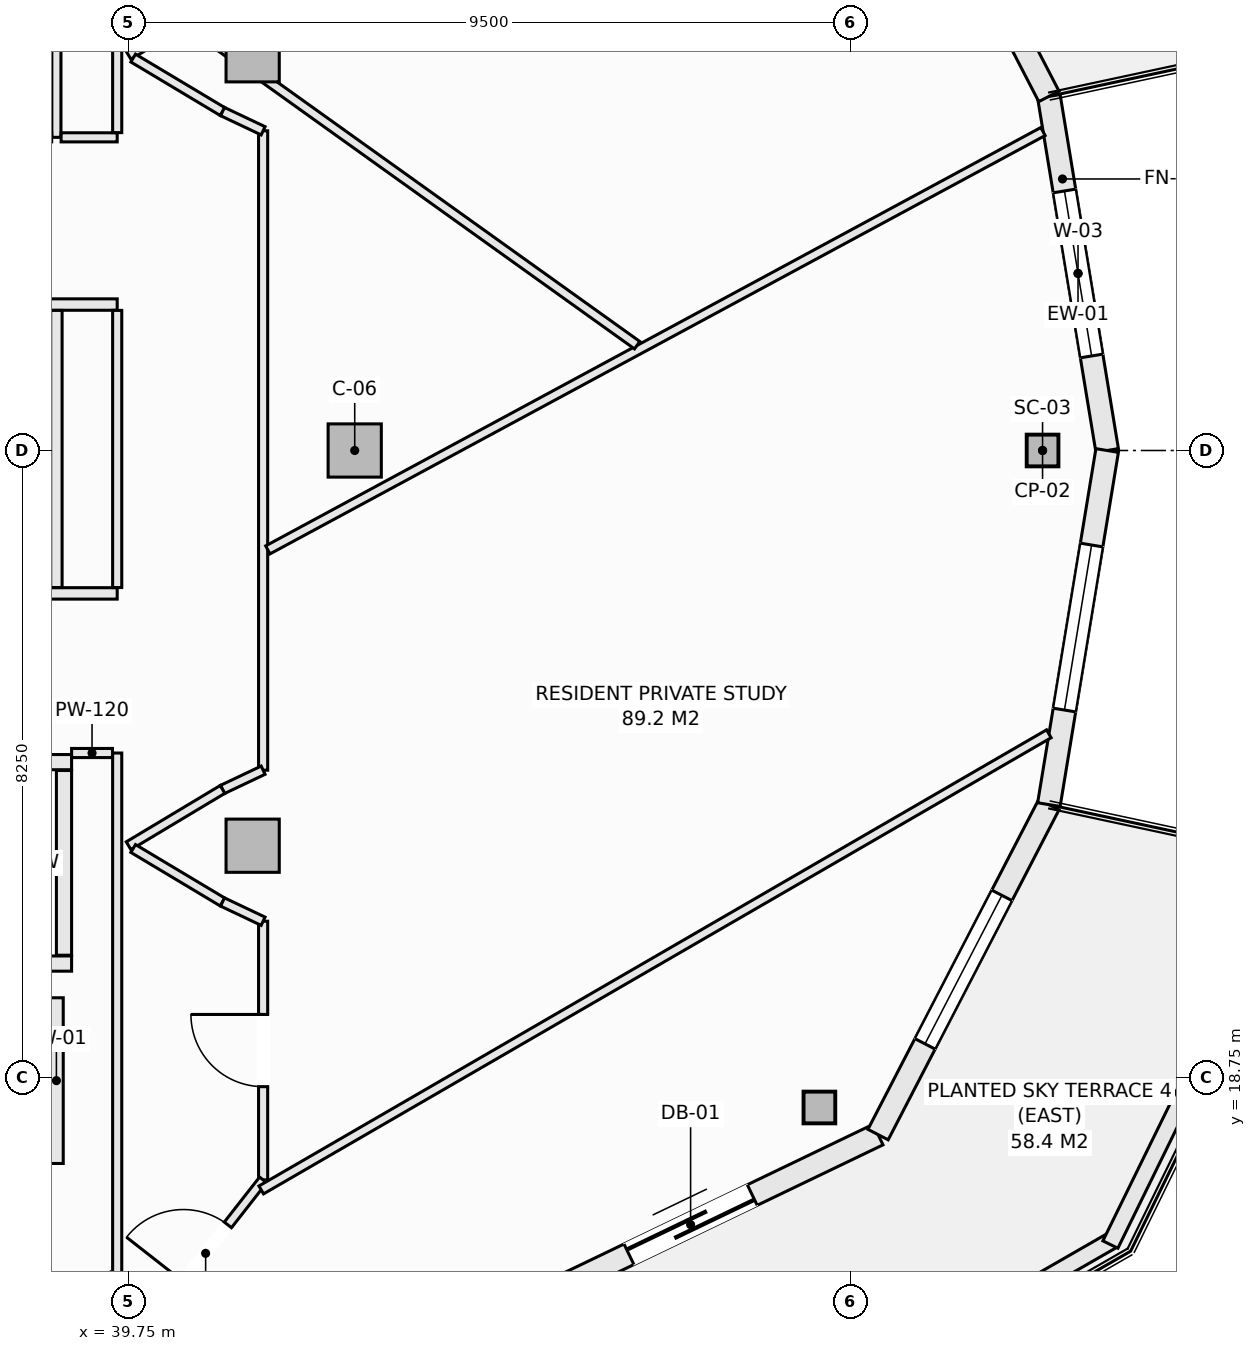
"""IFC4 building model, lengths in metres.
Left out: names, types, materials, properties, quantities, classifications, styles, units other than length and angle.
Written with IfcOpenShell. Run it as: python <this file> out.ifc"""

import sys

from ifc_helpers import new_model, si_unit, direction, frame, frame_2d, origin, origin_2d, place, context, subcontext, project, spatial, rectangle, hollow_rectangle, extrude, element, fill, save


model = new_model("IFC4")
c1 = context("Model", 3, precision=1e-05, world=origin(), true_north=direction((0.0, 1.0)))
c2 = subcontext(c1, "Body", "Model", "MODEL_VIEW")
j1 = project(units=[si_unit("LENGTHUNIT", "METRE"), si_unit("PLANEANGLEUNIT", "RADIAN")], contexts=[c1])
p1 = place(None, origin())
s1 = spatial("IfcSite", under=j1, at=p1, CompositionType="ELEMENT")
p2 = place(p1, origin())
s2 = spatial("IfcBuilding", under=s1, at=p2, CompositionType="ELEMENT")
p3 = place(p2, frame((0.0, 0.0, 255.8)))
s3 = spatial("IfcBuildingStorey", under=s2, at=p3, CompositionType="ELEMENT", Elevation=255.8)
for number, where, z_axis, x_axis in (
    (1, (51.775, 27.0, -0.27), (0.0, 0.0, 1.0), (1.0, 0.0, 0.0)),
    (2, (48.839, 18.356, -0.27), (0.0, 0.0, 1.0), (1.0, 0.0, 0.0)),
):
    element("IfcColumn", number, at=place(p3, frame(where, z_axis=z_axis, x_axis=x_axis)), inside=s3, PredefinedType="COLUMN", context=c2, shape_type="SweptSolid", body=[
        extrude(hollow_rectangle(XDim=0.406, YDim=0.406, WallThickness=0.016, at=origin_2d()), origin(), (0.0, 0.0, 1.0), 3.3),
    ])
for number, where, z_axis, x_axis in (
    (3, (42.725, 27.0, -0.27), (0.0, 0.0, 1.0), (1.0, 0.0, 0.0)),
    (4, (41.382, 32.199, -0.27), (0.0, 0.0, 1.0), (1.0, 0.0, 0.0)),
    (5, (41.382, 21.801, -0.27), (0.0, 0.0, 1.0), (1.0, 0.0, 0.0)),
):
    element("IfcColumn", number, at=place(p3, frame(where, z_axis=z_axis, x_axis=x_axis)), inside=s3, PredefinedType="COLUMN", context=c2, shape_type="SweptSolid", body=[
        extrude(rectangle(XDim=0.7, YDim=0.7, at=origin_2d()), origin(), (0.0, 0.0, 1.0), 3.3),
    ])
p4 = place(p3, frame((51.858, 31.659, 0.0), z_axis=(0.0, 0.0, 1.0), x_axis=(0.162369371657, -0.986730047758, 0.0)))
e6 = element("IfcWall", 6, at=p4, inside=s3, PredefinedType="SOLIDWALL", context=c2, shape_type="SweptSolid", body=[
    extrude(rectangle(XDim=4.721, YDim=0.3, at=frame_2d((2.361, 0.0))), origin(), (0.0, 0.0, 1.0), 2.605),
])
p5 = place(p4, frame((1.261, 0.0, 0.72)))
e7 = element("IfcOpeningElement", 7, at=p5, cuts=e6, PredefinedType="OPENING", context=c2, shape_type="SweptSolid", body=[
    extrude(rectangle(XDim=2.2, YDim=1.65, at=frame_2d((1.1, 0.825))), frame((0.0, 0.16, 0.0), z_axis=(0.0, -1.0, 0.0), x_axis=(1.0, 0.0, 0.0)), (0.0, 0.0, 1.0), 0.32),
])
p6 = place(p3, frame((49.611, 36.0, 0.0), z_axis=(0.0, 0.0, 1.0), x_axis=(0.459793771602, -0.888025724625, 0.0)))
e8 = element("IfcWall", 8, at=p6, inside=s3, PredefinedType="SOLIDWALL", context=c2, shape_type="SweptSolid", body=[
    extrude(rectangle(XDim=4.889, YDim=0.3, at=frame_2d((2.444, 0.0))), origin(), (0.0, 0.0, 1.0), 2.605),
])
p7 = place(p6, frame((1.344, 0.0, 0.72)))
e9 = element("IfcOpeningElement", 9, at=p7, cuts=e8, PredefinedType="OPENING", context=c2, shape_type="SweptSolid", body=[
    extrude(rectangle(XDim=2.2, YDim=1.65, at=frame_2d((1.1, 0.825))), frame((0.0, 0.16, 0.0), z_axis=(0.0, -1.0, 0.0), x_axis=(1.0, 0.0, 0.0)), (0.0, 0.0, 1.0), 0.32),
])
p8 = place(p3, frame((44.677, 15.63, 0.0), z_axis=(0.0, 0.0, 1.0), x_axis=(0.901355238351, 0.433080517106, 0.0)))
e10 = element("IfcWall", 10, at=p8, inside=s3, PredefinedType="SOLIDWALL", context=c2, shape_type="SweptSolid", body=[
    extrude(rectangle(XDim=5.473, YDim=0.3, at=frame_2d((2.737, 0.0))), origin(), (0.0, 0.0, 1.0), 2.605),
])
p9 = place(p8, frame((1.837, 0.0, 0.0)))
e11 = element("IfcOpeningElement", 11, at=p9, cuts=e10, PredefinedType="OPENING", context=c2, shape_type="SweptSolid", body=[
    extrude(rectangle(XDim=1.8, YDim=2.25, at=frame_2d((0.9, 1.125))), frame((0.0, 0.16, 0.0), z_axis=(0.0, -1.0, 0.0), x_axis=(1.0, 0.0, 0.0)), (0.0, 0.0, 1.0), 0.32),
])
p10 = place(p3, frame((49.611, 18.0, 0.0), z_axis=(0.0, 0.0, 1.0), x_axis=(0.459793771602, 0.888025724625, 0.0)))
e12 = element("IfcWall", 12, at=p10, inside=s3, PredefinedType="SOLIDWALL", context=c2, shape_type="SweptSolid", body=[
    extrude(rectangle(XDim=4.889, YDim=0.3, at=frame_2d((2.444, 0.0))), origin(), (0.0, 0.0, 1.0), 2.605),
])
p11 = place(p10, frame((1.344, 0.0, 0.72)))
e13 = element("IfcOpeningElement", 13, at=p11, cuts=e12, PredefinedType="OPENING", context=c2, shape_type="SweptSolid", body=[
    extrude(rectangle(XDim=2.2, YDim=1.65, at=frame_2d((1.1, 0.825))), frame((0.0, 0.16, 0.0), z_axis=(0.0, -1.0, 0.0), x_axis=(1.0, 0.0, 0.0)), (0.0, 0.0, 1.0), 0.32),
])
p12 = place(p3, frame((51.858, 22.341, 0.0), z_axis=(0.0, 0.0, 1.0), x_axis=(0.162369371657, 0.986730047758, 0.0)))
e14 = element("IfcWall", 14, at=p12, inside=s3, PredefinedType="SOLIDWALL", context=c2, shape_type="SweptSolid", body=[
    extrude(rectangle(XDim=4.721, YDim=0.3, at=frame_2d((2.361, 0.0))), origin(), (0.0, 0.0, 1.0), 2.605),
])
p13 = place(p12, frame((1.261, 0.0, 0.72)))
e15 = element("IfcOpeningElement", 15, at=p13, cuts=e14, PredefinedType="OPENING", context=c2, shape_type="SweptSolid", body=[
    extrude(rectangle(XDim=2.2, YDim=1.65, at=frame_2d((1.1, 0.825))), frame((0.0, 0.16, 0.0), z_axis=(0.0, -1.0, 0.0), x_axis=(1.0, 0.0, 0.0)), (0.0, 0.0, 1.0), 0.32),
])
p14 = place(p3, frame((47.321, 13.521, 0.0), z_axis=(0.0, 0.0, 1.0), x_axis=(0.866901621005, 0.49847926687, 0.0)))
e16 = element("IfcWall", 16, at=p14, inside=s3, PredefinedType="PARAPET", context=c2, shape_type="SweptSolid", body=[
    extrude(rectangle(XDim=6.197, YDim=0.22, at=frame_2d((3.098, 0.0))), origin(), (0.0, 0.0, 1.0), 0.52),
])
p15 = place(p3, frame((52.667, 16.553, 0.0), z_axis=(0.0, 0.0, 1.0), x_axis=(0.440058847499, 0.897968936399, 0.0)))
e17 = element("IfcWall", 17, at=p15, inside=s3, PredefinedType="PARAPET", context=c2, shape_type="SweptSolid", body=[
    extrude(rectangle(XDim=5.689, YDim=0.22, at=frame_2d((2.845, 0.0))), origin(), (0.0, 0.0, 1.0), 0.52),
])
p16 = place(p3, frame((36.75, 22.9, 0.0), z_axis=(0.0, 0.0, 1.0), x_axis=(1.0, 0.0, 0.0)))
e18 = element("IfcWall", 18, at=p16, inside=s3, PredefinedType="SOLIDWALL", context=c2, shape_type="SweptSolid", body=[
    extrude(rectangle(XDim=2.25, YDim=0.2, at=frame_2d((1.125, 0.0))), origin(), (0.0, 0.0, 1.0), 3.03),
])
p17 = place(p16, frame((0.575, 0.0, 0.0)))
e19 = element("IfcOpeningElement", 19, at=p17, cuts=e18, PredefinedType="OPENING", context=c2, shape_type="SweptSolid", body=[
    extrude(rectangle(XDim=1.1, YDim=2.2, at=frame_2d((0.55, 1.1))), frame((0.0, 0.11, 0.0), z_axis=(0.0, -1.0, 0.0), x_axis=(1.0, 0.0, 0.0)), (0.0, 0.0, 1.0), 0.22),
])
p18 = place(p3, frame((36.75, 20.25, 0.0), z_axis=(0.0, 0.0, 1.0), x_axis=(1.0, 0.0, 0.0)))
e20 = element("IfcWall", 20, at=p18, inside=s3, PredefinedType="SOLIDWALL", context=c2, shape_type="SweptSolid", body=[
    extrude(rectangle(XDim=2.25, YDim=0.2, at=frame_2d((1.125, 0.0))), origin(), (0.0, 0.0, 1.0), 3.03),
])
p19 = place(p3, frame((38.9, 20.36, 0.0), z_axis=(0.0, 0.0, 1.0), x_axis=(0.0, 1.0, 0.0)))
e21 = element("IfcWall", 21, at=p19, inside=s3, PredefinedType="SOLIDWALL", context=c2, shape_type="SweptSolid", body=[
    extrude(rectangle(XDim=2.43, YDim=0.2, at=frame_2d((1.215, 0.0))), origin(), (0.0, 0.0, 1.0), 3.03),
])
p20 = place(p3, frame((29.96, 25.12, 0.0), z_axis=(0.0, 0.0, 1.0), x_axis=(1.0, 0.0, 0.0)))
e22 = element("IfcWall", 22, at=p20, inside=s3, PredefinedType="PARTITIONING", context=c2, shape_type="SweptSolid", body=[
    extrude(rectangle(XDim=9.64, YDim=0.15, at=frame_2d((4.82, 0.0))), origin(), (0.0, 0.0, 1.0), 3.03),
])
p21 = place(p20, frame((3.05, 0.0, 0.0)))
e23 = element("IfcOpeningElement", 23, at=p21, cuts=e22, PredefinedType="OPENING", context=c2, shape_type="SweptSolid", body=[
    extrude(rectangle(XDim=0.95, YDim=2.1, at=frame_2d((0.475, 1.05))), frame((0.0, 0.085, 0.0), z_axis=(0.0, -1.0, 0.0), x_axis=(1.0, 0.0, 0.0)), (0.0, 0.0, 1.0), 0.17),
])
p22 = place(p20, frame((7.265, 0.0, 0.0)))
e24 = element("IfcOpeningElement", 24, at=p22, cuts=e22, PredefinedType="OPENING", context=c2, shape_type="SweptSolid", body=[
    extrude(rectangle(XDim=0.95, YDim=2.1, at=frame_2d((0.475, 1.05))), frame((0.0, 0.085, 0.0), z_axis=(0.0, -1.0, 0.0), x_axis=(1.0, 0.0, 0.0)), (0.0, 0.0, 1.0), 0.17),
])
p23 = place(p3, frame((30.077, 28.92, 0.0), z_axis=(0.0, 0.0, 1.0), x_axis=(1.0, 0.0, 0.0)))
e25 = element("IfcWall", 25, at=p23, inside=s3, PredefinedType="PARTITIONING", context=c2, shape_type="SweptSolid", body=[
    extrude(rectangle(XDim=9.523, YDim=0.15, at=frame_2d((4.762, 0.0))), origin(), (0.0, 0.0, 1.0), 3.03),
])
p24 = place(p3, frame((38.8, 17.62, 0.0), z_axis=(0.0, 0.0, 1.0), x_axis=(0.0, 1.0, 0.0)))
e26 = element("IfcWall", 26, at=p24, inside=s3, PredefinedType="SOLIDWALL", context=c2, shape_type="SweptSolid", body=[
    extrude(rectangle(XDim=2.18, YDim=0.18, at=frame_2d((1.09, 0.0))), origin(), (0.0, 0.0, 1.0), 3.03),
])
p25 = place(p3, frame((38.8, 25.197, 0.0), z_axis=(0.0, 0.0, 1.0), x_axis=(0.0, 1.0, 0.0)))
e27 = element("IfcWall", 27, at=p25, inside=s3, PredefinedType="PARTITIONING", context=c2, shape_type="SweptSolid", body=[
    extrude(rectangle(XDim=3.646, YDim=0.15, at=frame_2d((1.823, 0.0))), origin(), (0.0, 0.0, 1.0), 3.03),
])
p26 = place(p3, frame((38.8, 31.12, 0.0), z_axis=(0.0, 0.0, 1.0), x_axis=(0.0, 1.0, 0.0)))
e28 = element("IfcWall", 28, at=p26, inside=s3, PredefinedType="PARTITIONING", context=c2, shape_type="SweptSolid", body=[
    extrude(rectangle(XDim=2.63, YDim=0.12, at=frame_2d((1.315, 0.0))), origin(), (0.0, 0.0, 1.0), 3.03),
])
p27 = place(p3, frame((38.862, 31.12, 0.0), z_axis=(0.0, 0.0, 1.0), x_axis=(1.0, 0.0, 0.0)))
e29 = element("IfcWall", 29, at=p27, inside=s3, PredefinedType="PARTITIONING", context=c2, shape_type="SweptSolid", body=[
    extrude(rectangle(XDim=0.738, YDim=0.12, at=frame_2d((0.369, 0.0))), origin(), (0.0, 0.0, 1.0), 3.03),
])
p28 = place(p3, frame((39.6, 14.952, 0.0), z_axis=(0.0, 0.0, 1.0), x_axis=(0.0, 1.0, 0.0)))
e30 = element("IfcWall", 30, at=p28, inside=s3, PredefinedType="PARTITIONING", context=c2, shape_type="SweptSolid", body=[
    extrude(rectangle(XDim=8.068, YDim=0.12, at=frame_2d((4.034, 0.0))), origin(), (0.0, 0.0, 1.0), 2.478),
])
p29 = place(p3, frame((39.6, 25.197, 0.0), z_axis=(0.0, 0.0, 1.0), x_axis=(0.0, 1.0, 0.0)))
e31 = element("IfcWall", 31, at=p29, inside=s3, PredefinedType="PARTITIONING", context=c2, shape_type="SweptSolid", body=[
    extrude(rectangle(XDim=3.646, YDim=0.12, at=frame_2d((1.823, 0.0))), origin(), (0.0, 0.0, 1.0), 3.03),
])
p30 = place(p3, frame((39.6, 31.182, 0.0), z_axis=(0.0, 0.0, 1.0), x_axis=(0.0, 1.0, 0.0)))
e32 = element("IfcWall", 32, at=p30, inside=s3, PredefinedType="PARTITIONING", context=c2, shape_type="SweptSolid", body=[
    extrude(rectangle(XDim=7.866, YDim=0.12, at=frame_2d((3.933, 0.0))), origin(), (0.0, 0.0, 1.0), 3.03),
])
p31 = place(p3, frame((41.52, 17.404, 0.0), z_axis=(0.0, 0.0, 1.0), x_axis=(0.0, 1.0, 0.0)))
e33 = element("IfcWall", 33, at=p31, inside=s3, PredefinedType="PARTITIONING", context=c2, shape_type="SweptSolid", body=[
    extrude(rectangle(XDim=3.403, YDim=0.12, at=frame_2d((1.701, 0.0))), origin(), (0.0, 0.0, 1.0), 3.03),
])
p32 = place(p31, frame((1.227, 0.0, 0.0)))
e34 = element("IfcOpeningElement", 34, at=p32, cuts=e33, PredefinedType="OPENING", context=c2, shape_type="SweptSolid", body=[
    extrude(rectangle(XDim=0.95, YDim=2.1, at=frame_2d((0.475, 1.05))), frame((0.0, 0.07, 0.0), z_axis=(0.0, -1.0, 0.0), x_axis=(1.0, 0.0, 0.0)), (0.0, 0.0, 1.0), 0.14),
])
p33 = place(p3, frame((41.52, 22.794, 0.0), z_axis=(0.0, 0.0, 1.0), x_axis=(0.0, 1.0, 0.0)))
e35 = element("IfcWall", 35, at=p33, inside=s3, PredefinedType="PARTITIONING", context=c2, shape_type="SweptSolid", body=[
    extrude(rectangle(XDim=8.412, YDim=0.12, at=frame_2d((4.206, 0.0))), origin(), (0.0, 0.0, 1.0), 2.478),
])
p34 = place(p3, frame((39.75, 32.199, 0.0), z_axis=(0.0, 0.0, 1.0), x_axis=(0.857702120906, 0.514146935996, 0.0)))
e36 = element("IfcWall", 36, at=p34, inside=s3, PredefinedType="PARTITIONING", context=c2, shape_type="SweptSolid", body=[
    extrude(rectangle(XDim=1.441, YDim=0.12, at=frame_2d((0.721, 0.0))), origin(), (0.0, 0.0, 1.0), 3.03),
])
p35 = place(p3, frame((39.81, 32.163, 0.0), z_axis=(0.0, 0.0, 1.0), x_axis=(0.858011245414, -0.513630901273, 0.0)))
e37 = element("IfcWall", 37, at=p35, inside=s3, PredefinedType="PARTITIONING", context=c2, shape_type="SweptSolid", body=[
    extrude(rectangle(XDim=1.37, YDim=0.12, at=frame_2d((0.685, 0.0))), origin(), (0.0, 0.0, 1.0), 3.03),
])
for number, where, z_axis, x_axis in (
    (38, (40.986, 31.459, 0.0), (0.0, 0.0, 1.0), (0.904, -0.428, 0.0)),
    (39, (40.986, 22.541, 0.0), (0.0, 0.0, 1.0), (0.904, 0.428, 0.0)),
):
    element("IfcWall", number, at=place(p3, frame(where, z_axis=z_axis, x_axis=x_axis)), inside=s3, PredefinedType="PARTITIONING", context=c2, shape_type="SweptSolid", body=[
        extrude(rectangle(XDim=0.591, YDim=0.12, at=frame_2d((0.295, 0.0))), origin(), (0.0, 0.0, 1.0), 3.03),
    ])
p36 = place(p3, frame((39.75, 21.8, 0.0), z_axis=(0.0, 0.0, 1.0), x_axis=(0.857702120906, 0.514146935996, 0.0)))
e40 = element("IfcWall", 40, at=p36, inside=s3, PredefinedType="PARTITIONING", context=c2, shape_type="SweptSolid", body=[
    extrude(rectangle(XDim=1.441, YDim=0.12, at=frame_2d((0.721, 0.0))), origin(), (0.0, 0.0, 1.0), 3.03),
])
p37 = place(p3, frame((39.81, 21.764, 0.0), z_axis=(0.0, 0.0, 1.0), x_axis=(0.858011245414, -0.513630901273, 0.0)))
e41 = element("IfcWall", 41, at=p37, inside=s3, PredefinedType="PARTITIONING", context=c2, shape_type="SweptSolid", body=[
    extrude(rectangle(XDim=1.37, YDim=0.12, at=frame_2d((0.685, 0.0))), origin(), (0.0, 0.0, 1.0), 3.03),
])
p38 = place(p3, frame((40.986, 21.06, 0.0), z_axis=(0.0, 0.0, 1.0), x_axis=(0.90356951601, -0.428441512621, 0.0)))
e42 = element("IfcWall", 42, at=p38, inside=s3, PredefinedType="PARTITIONING", context=c2, shape_type="SweptSolid", body=[
    extrude(rectangle(XDim=0.591, YDim=0.12, at=frame_2d((0.295, 0.0))), origin(), (0.0, 0.0, 1.0), 3.03),
])
p39 = place(p3, frame((39.662, 15.031, 0.0), z_axis=(0.0, 0.0, 1.0), x_axis=(0.616500468458, 0.787354540465, 0.0)))
e43 = element("IfcWall", 43, at=p39, inside=s3, PredefinedType="PARTITIONING", context=c2, shape_type="SweptSolid", body=[
    extrude(rectangle(XDim=3.014, YDim=0.12, at=frame_2d((1.507, 0.0))), origin(), (0.0, 0.0, 1.0), 3.03),
])
p40 = place(p39, frame((1.312, 0.0, 0.0)))
e44 = element("IfcOpeningElement", 44, at=p40, cuts=e43, PredefinedType="OPENING", context=c2, shape_type="SweptSolid", body=[
    extrude(rectangle(XDim=0.95, YDim=2.1, at=frame_2d((0.475, 1.05))), frame((0.0, 0.07, 0.0), z_axis=(0.0, -1.0, 0.0), x_axis=(1.0, 0.0, 0.0)), (0.0, 0.0, 1.0), 0.14),
])
p41 = place(p3, frame((39.0, 23.02, 0.0), z_axis=(0.0, 0.0, 1.0), x_axis=(1.0, 0.0, 0.0)))
e45 = element("IfcWall", 45, at=p41, inside=s3, PredefinedType="PARTITIONING", context=c2, shape_type="SweptSolid", body=[
    extrude(rectangle(XDim=0.538, YDim=0.12, at=frame_2d((0.269, 0.0))), origin(), (0.0, 0.0, 1.0), 3.03),
])
p42 = place(p3, frame((41.582, 25.693, 0.0), z_axis=(0.0, 0.0, 1.0), x_axis=(0.880032375067, 0.474913696195, 0.0)))
e46 = element("IfcWall", 46, at=p42, inside=s3, PredefinedType="PARTITIONING", context=c2, shape_type="SweptSolid", body=[
    extrude(rectangle(XDim=11.589, YDim=0.12, at=frame_2d((5.794, 0.0))), origin(), (0.0, 0.0, 1.0), 1.823),
])
p43 = place(p3, frame((41.495, 17.272, 0.0), z_axis=(0.0, 0.0, 1.0), x_axis=(0.865359277242, 0.501151994201, 0.0)))
e47 = element("IfcWall", 47, at=p43, inside=s3, PredefinedType="PARTITIONING", context=c2, shape_type="SweptSolid", body=[
    extrude(rectangle(XDim=11.975, YDim=0.12, at=frame_2d((5.987, 0.0))), origin(), (0.0, 0.0, 1.0), 3.03),
])
p44 = place(p3, frame((40.546, 32.604, 0.0), z_axis=(0.0, 0.0, 1.0), x_axis=(0.813264440548, -0.581894277116, 0.0)))
e48 = element("IfcWall", 48, at=p44, inside=s3, PredefinedType="PARTITIONING", context=c2, shape_type="SweptSolid", body=[
    extrude(rectangle(XDim=7.249, YDim=0.12, at=frame_2d((3.625, 0.0))), origin(), (0.0, 0.0, 1.0), 3.03),
])
p45 = place(p5, origin())
e49 = element("IfcWindow", 49, at=p45, inside=s3, PartitioningType="SINGLE_PANEL", PredefinedType="WINDOW", context=c2, shape_type="SweptSolid", body=[
    extrude(rectangle(XDim=2.2, YDim=1.65, at=frame_2d((1.1, 0.825))), frame((0.0, 0.03, 0.0), z_axis=(0.0, -1.0, 0.0), x_axis=(1.0, 0.0, 0.0)), (0.0, 0.0, 1.0), 0.06),
])
fill(e7, e49)
p46 = place(p9, frame((1.8, 0.0, 0.0), z_axis=(0.0, 0.0, 1.0), x_axis=(-1.0, 0.0, 0.0)))
e50 = element("IfcDoor", 50, at=p46, inside=s3, OperationType="SLIDING_TO_LEFT", PredefinedType="DOOR", context=c2, shape_type="SweptSolid", body=[
    extrude(rectangle(XDim=1.8, YDim=2.25, at=frame_2d((0.9, 1.125))), frame((0.0, 0.025, 0.0), z_axis=(0.0, -1.0, 0.0), x_axis=(1.0, 0.0, 0.0)), (0.0, 0.0, 1.0), 0.05),
])
fill(e11, e50)
p47 = place(p11, origin())
e51 = element("IfcWindow", 51, at=p47, inside=s3, PartitioningType="SINGLE_PANEL", PredefinedType="WINDOW", context=c2, shape_type="SweptSolid", body=[
    extrude(rectangle(XDim=2.2, YDim=1.65, at=frame_2d((1.1, 0.825))), frame((0.0, 0.03, 0.0), z_axis=(0.0, -1.0, 0.0), x_axis=(1.0, 0.0, 0.0)), (0.0, 0.0, 1.0), 0.06),
])
fill(e13, e51)
p48 = place(p13, origin())
e52 = element("IfcWindow", 52, at=p48, inside=s3, PartitioningType="SINGLE_PANEL", PredefinedType="WINDOW", context=c2, shape_type="SweptSolid", body=[
    extrude(rectangle(XDim=2.2, YDim=1.65, at=frame_2d((1.1, 0.825))), frame((0.0, 0.03, 0.0), z_axis=(0.0, -1.0, 0.0), x_axis=(1.0, 0.0, 0.0)), (0.0, 0.0, 1.0), 0.06),
])
fill(e15, e52)
p49 = place(p40, origin())
e53 = element("IfcDoor", 53, at=p49, inside=s3, OperationType="SINGLE_SWING_LEFT", PredefinedType="DOOR", context=c2, shape_type="SweptSolid", body=[
    extrude(rectangle(XDim=0.95, YDim=2.1, at=frame_2d((0.475, 1.05))), frame((0.0, 0.025, 0.0), z_axis=(0.0, -1.0, 0.0), x_axis=(1.0, 0.0, 0.0)), (0.0, 0.0, 1.0), 0.05),
])
fill(e44, e53)
p50 = place(p32, origin())
e54 = element("IfcDoor", 54, at=p50, inside=s3, OperationType="SINGLE_SWING_RIGHT", PredefinedType="DOOR", context=c2, shape_type="SweptSolid", body=[
    extrude(rectangle(XDim=0.95, YDim=2.1, at=frame_2d((0.475, 1.05))), frame((0.0, 0.025, 0.0), z_axis=(0.0, -1.0, 0.0), x_axis=(1.0, 0.0, 0.0)), (0.0, 0.0, 1.0), 0.05),
])
fill(e34, e54)
save(model, sys.argv[1])
